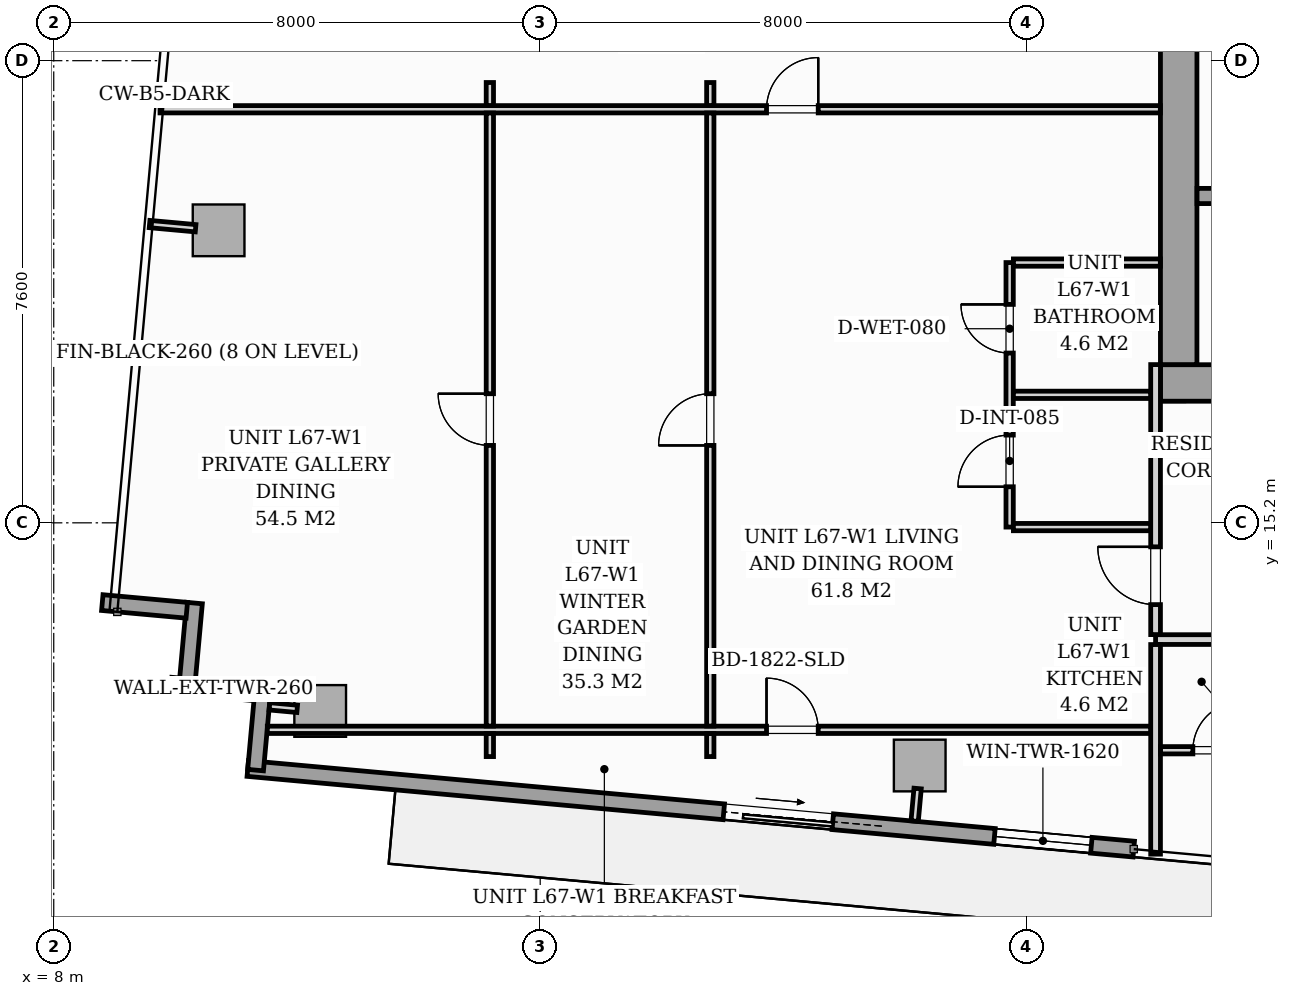
"""IFC4 building model, lengths in metres.
Left out: names, types, materials, properties, quantities, classifications, styles, units other than length and angle.
Written with IfcOpenShell. Run it as: python <this file> out.ifc"""

import sys

from ifc_helpers import new_model, si_unit, direction, frame, frame_2d, origin, origin_2d, place, context, subcontext, project, spatial, rectangle, i_section, extrude, source, transform, mapped, element, fill, save


model = new_model("IFC4")
c1 = context("Model", 3, precision=1e-05, world=origin(), true_north=direction((0.0, 1.0)))
c2 = subcontext(c1, "Body", "Model", "MODEL_VIEW")
j1 = project(units=[si_unit("LENGTHUNIT", "METRE"), si_unit("PLANEANGLEUNIT", "RADIAN")], contexts=[c1])
p1 = place(None, origin())
s1 = spatial("IfcSite", under=j1, at=p1, CompositionType="ELEMENT")
p2 = place(p1, origin())
s2 = spatial("IfcBuilding", under=s1, at=p2, CompositionType="ELEMENT")
p3 = place(p2, frame((0.0, 0.0, 233.1)))
s3 = spatial("IfcBuildingStorey", under=s2, at=p3, CompositionType="ELEMENT", Elevation=233.1)
m1 = source(origin(), c2, "Body", "SweptSolid", [
    extrude(i_section(OverallWidth=0.409, OverallDepth=0.425, WebThickness=0.033, FlangeThickness=0.052, FilletRadius=0.018, at=origin_2d()), origin(), (0.0, 0.0, 1.0), 3.296),
])
p4 = place(p3, frame((26.4, 17.4, 0.002), z_axis=(0.0, 0.0, 1.0), x_axis=(1.0, 0.0, 0.0)))
e1 = element("IfcColumn", 1, at=p4, inside=s3, PredefinedType="PILASTER", context=c2, shape_type="MappedRepresentation", body=[
    mapped(m1, transform((0.0, 0.0, 0.0), scale=1.0)),
])
m2 = source(origin(), c2, "Body", "SweptSolid", [
    extrude(rectangle(XDim=0.85, YDim=0.85, at=origin_2d()), origin(), (0.0, 0.0, 1.0), 3.296),
])
for number, where, z_axis, x_axis in (
    (2, (12.382, 12.106, 0.002), (0.0, 0.0, 1.0), (0.996, -0.091, 0.0)),
    (3, (22.241, 11.209, 0.002), (0.0, 0.0, 1.0), (0.996, -0.091, 0.0)),
    (4, (10.711, 20.01, 0.002), (0.0, 0.0, 1.0), (0.996, -0.091, 0.0)),
):
    element("IfcColumn", number, at=place(p3, frame(where, z_axis=z_axis, x_axis=x_axis)), inside=s3, PredefinedType="COLUMN", context=c2, shape_type="MappedRepresentation", body=[
        mapped(m2, transform((0.0, 0.0, 0.0), scale=1.0)),
    ])
p5 = place(p3, frame((11.319, 12.404, 0.0), z_axis=(0.0, 0.0, 1.0), x_axis=(-0.995881721538, 0.090661991521, 0.0)))
e5 = element("IfcWall", 5, at=p5, inside=s3, PredefinedType="STANDARD", context=c2, shape_type="SweptSolid", body=[
    extrude(rectangle(XDim=1.395, YDim=0.26, at=frame_2d((0.698, 0.0))), origin(), (0.0, 0.0, 1.0), 3.04),
])
p6 = place(p3, frame((10.188, 12.492, 0.0), z_axis=(0.0, 0.0, 1.0), x_axis=(0.090646191665, 0.995883159782, 0.0)))
e6 = element("IfcWall", 6, at=p6, inside=s3, PredefinedType="STANDARD", context=c2, shape_type="SweptSolid", body=[
    extrude(rectangle(XDim=1.395, YDim=0.26, at=frame_2d((0.698, 0.0))), origin(), (0.0, 0.0, 1.0), 3.04),
])
p7 = place(p3, frame((10.188, 13.762, 0.0), z_axis=(0.0, 0.0, 1.0), x_axis=(-0.995881721538, 0.090661991521, 0.0)))
e7 = element("IfcWall", 7, at=p7, inside=s3, PredefinedType="STANDARD", context=c2, shape_type="SweptSolid", body=[
    extrude(rectangle(XDim=1.395, YDim=0.26, at=frame_2d((0.698, 0.0))), origin(), (0.0, 0.0, 1.0), 3.04),
])
p8 = place(p3, frame((25.761, 9.834, 0.0), z_axis=(0.0, 0.0, 1.0), x_axis=(-0.995884584572, 0.090630536861, 0.0)))
e8 = element("IfcWall", 8, at=p8, inside=s3, PredefinedType="STANDARD", context=c2, shape_type="SweptSolid", body=[
    extrude(rectangle(XDim=14.63, YDim=0.26, at=frame_2d((7.315, 0.0))), origin(), (0.0, 0.0, 1.0), 3.04),
])
p9 = place(p8, frame((4.97, 0.0, 0.0)))
e9 = element("IfcOpeningElement", 9, at=p9, cuts=e8, PredefinedType="OPENING", context=c2, shape_type="SweptSolid", body=[
    extrude(rectangle(XDim=1.8, YDim=2.06, at=frame_2d((0.9, 1.03))), frame((0.0, 0.14, 0.0), z_axis=(0.0, -1.0, 0.0), x_axis=(1.0, 0.0, 0.0)), (0.0, 0.0, 1.0), 0.28),
])
p10 = place(p8, frame((0.7, 0.0, 0.65)))
e10 = element("IfcOpeningElement", 10, at=p10, cuts=e8, PredefinedType="OPENING", context=c2, shape_type="SweptSolid", body=[
    extrude(rectangle(XDim=1.6, YDim=1.5, at=frame_2d((0.8, 0.75))), frame((0.0, 0.14, 0.0), z_axis=(0.0, -1.0, 0.0), x_axis=(1.0, 0.0, 0.0)), (0.0, 0.0, 1.0), 0.28),
])
p11 = place(p3, frame((11.319, 11.134, 0.0), z_axis=(0.0, 0.0, 1.0), x_axis=(0.090661991521, 0.995881721538, 0.0)))
e11 = element("IfcWall", 11, at=p11, inside=s3, PredefinedType="STANDARD", context=c2, shape_type="SweptSolid", body=[
    extrude(rectangle(XDim=1.395, YDim=0.26, at=frame_2d((0.698, 0.0))), origin(), (0.0, 0.0, 1.0), 3.04),
])
p12 = place(p3, frame((26.2, 17.5, 0.0), z_axis=(0.0, 0.0, 1.0), x_axis=(1.0, 0.0, 0.0)))
e12 = element("IfcWall", 12, at=p12, inside=s3, PredefinedType="SHEAR", context=c2, shape_type="SweptSolid", body=[
    extrude(rectangle(XDim=19.6, YDim=0.6, at=frame_2d((9.8, 0.0))), origin(), (0.0, 0.0, 1.0), 3.3),
])
p13 = place(p12, frame((0.95, 0.0, 0.0)))
e13 = element("IfcOpeningElement", 13, at=p13, cuts=e12, PredefinedType="OPENING", context=c2, shape_type="SweptSolid", body=[
    extrude(rectangle(XDim=0.95, YDim=2.06, at=frame_2d((0.475, 1.03))), frame((0.0, 0.31, 0.0), z_axis=(0.0, -1.0, 0.0), x_axis=(1.0, 0.0, 0.0)), (0.0, 0.0, 1.0), 0.62),
])
p14 = place(p12, frame((9.38, 0.0, 0.0)))
e14 = element("IfcOpeningElement", 14, at=p14, cuts=e12, PredefinedType="OPENING", context=c2, shape_type="SweptSolid", body=[
    extrude(rectangle(XDim=0.85, YDim=2.0, at=frame_2d((0.425, 1.0))), frame((0.0, 0.31, 0.0), z_axis=(0.0, -1.0, 0.0), x_axis=(1.0, 0.0, 0.0)), (0.0, 0.0, 1.0), 0.62),
])
p15 = place(p12, frame((17.55, 0.0, 0.0)))
e15 = element("IfcOpeningElement", 15, at=p15, cuts=e12, PredefinedType="OPENING", context=c2, shape_type="SweptSolid", body=[
    extrude(rectangle(XDim=0.95, YDim=2.06, at=frame_2d((0.475, 1.03))), frame((0.0, 0.31, 0.0), z_axis=(0.0, -1.0, 0.0), x_axis=(1.0, 0.0, 0.0)), (0.0, 0.0, 1.0), 0.62),
])
p16 = place(p3, frame((26.5, 17.802, 0.0), z_axis=(0.0, 0.0, 1.0), x_axis=(0.0, 1.0, 0.0)))
e16 = element("IfcWall", 16, at=p16, inside=s3, PredefinedType="SHEAR", context=c2, shape_type="SweptSolid", body=[
    extrude(rectangle(XDim=5.796, YDim=0.6, at=frame_2d((2.898, 0.0))), origin(), (0.0, 0.0, 1.0), 3.3),
])
p17 = place(p3, frame((26.802, 20.575, 0.0), z_axis=(0.0, 0.0, 1.0), x_axis=(1.0, 0.0, 0.0)))
e17 = element("IfcWall", 17, at=p17, inside=s3, PredefinedType="SOLIDWALL", context=c2, shape_type="SweptSolid", body=[
    extrude(rectangle(XDim=8.148, YDim=0.25, at=frame_2d((4.074, 0.0))), origin(), (0.0, 0.0, 1.0), 3.3),
])
p18 = place(p17, frame((0.298, 0.0, 0.0)))
e18 = element("IfcOpeningElement", 18, at=p18, cuts=e17, PredefinedType="OPENING", context=c2, shape_type="SweptSolid", body=[
    extrude(rectangle(XDim=0.95, YDim=2.06, at=frame_2d((0.475, 1.03))), frame((0.0, 0.135, 0.0), z_axis=(0.0, -1.0, 0.0), x_axis=(1.0, 0.0, 0.0)), (0.0, 0.0, 1.0), 0.27),
])
p19 = place(p3, frame((26.12, 13.28, 0.0), z_axis=(0.0, 0.0, 1.0), x_axis=(1.0, 0.0, 0.0)))
e19 = element("IfcWall", 19, at=p19, inside=s3, PredefinedType="PARTITIONING", context=c2, shape_type="SweptSolid", body=[
    extrude(rectangle(XDim=21.33, YDim=0.16, at=frame_2d((10.665, 0.0))), origin(), (0.0, 0.0, 1.0), 2.556),
])
p20 = place(p19, frame((4.704, 0.0, 0.0)))
e20 = element("IfcOpeningElement", 20, at=p20, cuts=e19, PredefinedType="OPENING", context=c2, shape_type="SweptSolid", body=[
    extrude(rectangle(XDim=0.95, YDim=2.06, at=frame_2d((0.475, 1.03))), frame((0.0, 0.09, 0.0), z_axis=(0.0, -1.0, 0.0), x_axis=(1.0, 0.0, 0.0)), (0.0, 0.0, 1.0), 0.18),
])
p21 = place(p19, frame((7.5, 0.0, 0.0)))
e21 = element("IfcOpeningElement", 21, at=p21, cuts=e19, PredefinedType="OPENING", context=c2, shape_type="SweptSolid", body=[
    extrude(rectangle(XDim=0.95, YDim=2.06, at=frame_2d((0.475, 1.03))), frame((0.0, 0.09, 0.0), z_axis=(0.0, -1.0, 0.0), x_axis=(1.0, 0.0, 0.0)), (0.0, 0.0, 1.0), 0.18),
])
p22 = place(p19, frame((14.976, 0.0, 0.0)))
e22 = element("IfcOpeningElement", 22, at=p22, cuts=e19, PredefinedType="OPENING", context=c2, shape_type="SweptSolid", body=[
    extrude(rectangle(XDim=0.95, YDim=2.06, at=frame_2d((0.475, 1.03))), frame((0.0, 0.09, 0.0), z_axis=(0.0, -1.0, 0.0), x_axis=(1.0, 0.0, 0.0)), (0.0, 0.0, 1.0), 0.18),
])
p23 = place(p3, frame((26.12, 9.751, 0.0), z_axis=(0.0, 0.0, 1.0), x_axis=(0.0, 1.0, 0.0)))
e23 = element("IfcWall", 23, at=p23, inside=s3, PredefinedType="PARTITIONING", context=c2, shape_type="SweptSolid", body=[
    extrude(rectangle(XDim=3.447, YDim=0.16, at=frame_2d((1.723, 0.0))), origin(), (0.0, 0.0, 1.0), 3.04),
])
p24 = place(p3, frame((26.12, 13.362, 0.0), z_axis=(0.0, 0.0, 1.0), x_axis=(0.0, 1.0, 0.0)))
e24 = element("IfcWall", 24, at=p24, inside=s3, PredefinedType="PARTITIONING", context=c2, shape_type="SweptSolid", body=[
    extrude(rectangle(XDim=4.44, YDim=0.16, at=frame_2d((2.22, 0.0))), origin(), (0.0, 0.0, 1.0), 3.04),
])
p25 = place(p24, frame((0.493, 0.0, 0.0)))
e25 = element("IfcOpeningElement", 25, at=p25, cuts=e24, PredefinedType="OPENING", context=c2, shape_type="SweptSolid", body=[
    extrude(rectangle(XDim=0.95, YDim=2.06, at=frame_2d((0.475, 1.03))), frame((0.0, 0.09, 0.0), z_axis=(0.0, -1.0, 0.0), x_axis=(1.0, 0.0, 0.0)), (0.0, 0.0, 1.0), 0.18),
])
p26 = place(p3, frame((26.202, 11.46, 0.0), z_axis=(0.0, 0.0, 1.0), x_axis=(1.0, 0.0, 0.0)))
e26 = element("IfcWall", 26, at=p26, inside=s3, PredefinedType="PARTITIONING", context=c2, shape_type="SweptSolid", body=[
    extrude(rectangle(XDim=3.978, YDim=0.12, at=frame_2d((1.989, 0.0))), origin(), (0.0, 0.0, 1.0), 2.556),
])
p27 = place(p26, frame((0.531, 0.0, 0.0)))
e27 = element("IfcOpeningElement", 27, at=p27, cuts=e26, PredefinedType="OPENING", context=c2, shape_type="SweptSolid", body=[
    extrude(rectangle(XDim=0.8, YDim=2.02, at=frame_2d((0.4, 1.01))), frame((0.0, 0.07, 0.0), z_axis=(0.0, -1.0, 0.0), x_axis=(1.0, 0.0, 0.0)), (0.0, 0.0, 1.0), 0.14),
])
p28 = place(p26, frame((2.496, 0.0, 0.0)))
e28 = element("IfcOpeningElement", 28, at=p28, cuts=e26, PredefinedType="OPENING", context=c2, shape_type="SweptSolid", body=[
    extrude(rectangle(XDim=0.85, YDim=2.05, at=frame_2d((0.425, 1.025))), frame((0.0, 0.07, 0.0), z_axis=(0.0, -1.0, 0.0), x_axis=(1.0, 0.0, 0.0)), (0.0, 0.0, 1.0), 0.14),
])
p29 = place(p3, frame((23.72, 15.13, 0.0), z_axis=(0.0, 0.0, 1.0), x_axis=(0.0, 1.0, 0.0)))
e29 = element("IfcWall", 29, at=p29, inside=s3, PredefinedType="PARTITIONING", context=c2, shape_type="SweptSolid", body=[
    extrude(rectangle(XDim=4.35, YDim=0.12, at=frame_2d((2.175, 0.0))), origin(), (0.0, 0.0, 1.0), 3.04),
])
p30 = place(p29, frame((0.663, 0.0, 0.0)))
e30 = element("IfcOpeningElement", 30, at=p30, cuts=e29, PredefinedType="OPENING", context=c2, shape_type="SweptSolid", body=[
    extrude(rectangle(XDim=0.85, YDim=2.05, at=frame_2d((0.425, 1.025))), frame((0.0, 0.07, 0.0), z_axis=(0.0, -1.0, 0.0), x_axis=(1.0, 0.0, 0.0)), (0.0, 0.0, 1.0), 0.14),
])
p31 = place(p29, frame((2.862, 0.0, 0.0)))
e31 = element("IfcOpeningElement", 31, at=p31, cuts=e29, PredefinedType="OPENING", context=c2, shape_type="SweptSolid", body=[
    extrude(rectangle(XDim=0.8, YDim=2.02, at=frame_2d((0.4, 1.01))), frame((0.0, 0.07, 0.0), z_axis=(0.0, -1.0, 0.0), x_axis=(1.0, 0.0, 0.0)), (0.0, 0.0, 1.0), 0.14),
])
p32 = place(p3, frame((23.782, 17.305, 0.0), z_axis=(0.0, 0.0, 1.0), x_axis=(1.0, 0.0, 0.0)))
e32 = element("IfcWall", 32, at=p32, inside=s3, PredefinedType="PARTITIONING", context=c2, shape_type="SweptSolid", body=[
    extrude(rectangle(XDim=2.256, YDim=0.12, at=frame_2d((1.128, 0.0))), origin(), (0.0, 0.0, 1.0), 2.381),
])
p33 = place(p3, frame((23.782, 15.13, 0.0), z_axis=(0.0, 0.0, 1.0), x_axis=(1.0, 0.0, 0.0)))
e33 = element("IfcWall", 33, at=p33, inside=s3, PredefinedType="PARTITIONING", context=c2, shape_type="SweptSolid", body=[
    extrude(rectangle(XDim=2.256, YDim=0.12, at=frame_2d((1.128, 0.0))), origin(), (0.0, 0.0, 1.0), 3.04),
])
p34 = place(p3, frame((23.782, 19.48, 0.0), z_axis=(0.0, 0.0, 1.0), x_axis=(1.0, 0.0, 0.0)))
e34 = element("IfcWall", 34, at=p34, inside=s3, PredefinedType="PARTITIONING", context=c2, shape_type="SweptSolid", body=[
    extrude(rectangle(XDim=2.416, YDim=0.12, at=frame_2d((1.208, 0.0))), origin(), (0.0, 0.0, 1.0), 3.04),
])
p35 = place(p3, frame((9.748, 22.001, 0.0), z_axis=(0.0, 0.0, 1.0), x_axis=(1.0, 0.0, 0.0)))
e35 = element("IfcWall", 35, at=p35, inside=s3, PredefinedType="PARTITIONING", context=c2, shape_type="SweptSolid", body=[
    extrude(rectangle(XDim=16.45, YDim=0.12, at=frame_2d((8.225, 0.0))), origin(), (0.0, 0.0, 1.0), 3.04),
])
p36 = place(p35, frame((9.974, 0.0, 0.0)))
e36 = element("IfcOpeningElement", 36, at=p36, cuts=e35, PredefinedType="OPENING", context=c2, shape_type="SweptSolid", body=[
    extrude(rectangle(XDim=0.85, YDim=2.05, at=frame_2d((0.425, 1.025))), frame((0.0, 0.07, 0.0), z_axis=(0.0, -1.0, 0.0), x_axis=(1.0, 0.0, 0.0)), (0.0, 0.0, 1.0), 0.14),
])
p37 = place(p3, frame((11.512, 11.796, 0.0), z_axis=(0.0, 0.0, 1.0), x_axis=(1.0, 0.0, 0.0)))
e37 = element("IfcWall", 37, at=p37, inside=s3, PredefinedType="PARTITIONING", context=c2, shape_type="SweptSolid", body=[
    extrude(rectangle(XDim=14.526, YDim=0.12, at=frame_2d((7.263, 0.0))), origin(), (0.0, 0.0, 1.0), 2.482),
])
p38 = place(p37, frame((8.21, 0.0, 0.0)))
e38 = element("IfcOpeningElement", 38, at=p38, cuts=e37, PredefinedType="OPENING", context=c2, shape_type="SweptSolid", body=[
    extrude(rectangle(XDim=0.85, YDim=2.05, at=frame_2d((0.425, 1.025))), frame((0.0, 0.07, 0.0), z_axis=(0.0, -1.0, 0.0), x_axis=(1.0, 0.0, 0.0)), (0.0, 0.0, 1.0), 0.14),
])
p39 = place(p3, frame((15.172, 11.356, 0.0), z_axis=(0.0, 0.0, 1.0), x_axis=(0.0, 1.0, 0.0)))
e39 = element("IfcWall", 39, at=p39, inside=s3, PredefinedType="PARTITIONING", context=c2, shape_type="SweptSolid", body=[
    extrude(rectangle(XDim=0.378, YDim=0.12, at=frame_2d((0.189, 0.0))), origin(), (0.0, 0.0, 1.0), 3.04),
])
p40 = place(p3, frame((15.172, 11.858, 0.0), z_axis=(0.0, 0.0, 1.0), x_axis=(0.0, 1.0, 0.0)))
e40 = element("IfcWall", 40, at=p40, inside=s3, PredefinedType="PARTITIONING", context=c2, shape_type="SweptSolid", body=[
    extrude(rectangle(XDim=10.081, YDim=0.12, at=frame_2d((5.041, 0.0))), origin(), (0.0, 0.0, 1.0), 3.04),
])
p41 = place(p40, frame((4.615, 0.0, 0.0)))
e41 = element("IfcOpeningElement", 41, at=p41, cuts=e40, PredefinedType="OPENING", context=c2, shape_type="SweptSolid", body=[
    extrude(rectangle(XDim=0.85, YDim=2.05, at=frame_2d((0.425, 1.025))), frame((0.0, 0.07, 0.0), z_axis=(0.0, -1.0, 0.0), x_axis=(1.0, 0.0, 0.0)), (0.0, 0.0, 1.0), 0.14),
])
for number, where, z_axis, x_axis in (
    (42, (15.172, 22.063, 0.0), (0.0, 0.0, 1.0), (0.0, 1.0, 0.0)),
    (43, (18.797, 11.356, 0.0), (0.0, 0.0, 1.0), (0.0, 1.0, 0.0)),
):
    element("IfcWall", number, at=place(p3, frame(where, z_axis=z_axis, x_axis=x_axis)), inside=s3, PredefinedType="PARTITIONING", context=c2, shape_type="SweptSolid", body=[
        extrude(rectangle(XDim=0.378, YDim=0.12, at=frame_2d((0.189, 0.0))), origin(), (0.0, 0.0, 1.0), 3.04),
    ])
p42 = place(p3, frame((18.797, 11.858, 0.0), z_axis=(0.0, 0.0, 1.0), x_axis=(0.0, 1.0, 0.0)))
e44 = element("IfcWall", 44, at=p42, inside=s3, PredefinedType="PARTITIONING", context=c2, shape_type="SweptSolid", body=[
    extrude(rectangle(XDim=10.081, YDim=0.12, at=frame_2d((5.041, 0.0))), origin(), (0.0, 0.0, 1.0), 3.04),
])
p43 = place(p42, frame((4.615, 0.0, 0.0)))
e45 = element("IfcOpeningElement", 45, at=p43, cuts=e44, PredefinedType="OPENING", context=c2, shape_type="SweptSolid", body=[
    extrude(rectangle(XDim=0.85, YDim=2.05, at=frame_2d((0.425, 1.025))), frame((0.0, 0.07, 0.0), z_axis=(0.0, -1.0, 0.0), x_axis=(1.0, 0.0, 0.0)), (0.0, 0.0, 1.0), 0.14),
])
p44 = place(p3, frame((18.797, 22.063, 0.0), z_axis=(0.0, 0.0, 1.0), x_axis=(0.0, 1.0, 0.0)))
e46 = element("IfcWall", 46, at=p44, inside=s3, PredefinedType="PARTITIONING", context=c2, shape_type="SweptSolid", body=[
    extrude(rectangle(XDim=0.378, YDim=0.12, at=frame_2d((0.189, 0.0))), origin(), (0.0, 0.0, 1.0), 3.04),
])
p45 = place(p3, frame((12.003, 12.141, 0.0), z_axis=(0.0, 0.0, 1.0), x_axis=(-0.995884462012, 0.090631883588, 0.0)))
e47 = element("IfcWall", 47, at=p45, inside=s3, PredefinedType="PARTITIONING", context=c2, shape_type="SweptSolid", body=[
    extrude(rectangle(XDim=0.458, YDim=0.12, at=frame_2d((0.229, 0.0))), origin(), (0.0, 0.0, 1.0), 3.04),
])
p46 = place(p3, frame((22.207, 10.831, 0.0), z_axis=(0.0, 0.0, 1.0), x_axis=(-0.090781299264, -0.995870852924, 0.0)))
e48 = element("IfcWall", 48, at=p46, inside=s3, PredefinedType="PARTITIONING", context=c2, shape_type="SweptSolid", body=[
    extrude(rectangle(XDim=0.538, YDim=0.12, at=frame_2d((0.269, 0.0))), origin(), (0.0, 0.0, 1.0), 3.04),
])
p47 = place(p3, frame((10.333, 20.045, 0.0), z_axis=(0.0, 0.0, 1.0), x_axis=(-0.995890573658, 0.09056470228, 0.0)))
e49 = element("IfcWall", 49, at=p47, inside=s3, PredefinedType="PARTITIONING", context=c2, shape_type="SweptSolid", body=[
    extrude(rectangle(XDim=0.76, YDim=0.12, at=frame_2d((0.38, 0.0))), origin(), (0.0, 0.0, 1.0), 3.04),
])
m3 = source(origin(), c2, "Body", "SweptSolid", [
    extrude(rectangle(XDim=1.8, YDim=2.06, at=frame_2d((0.9, 1.03))), frame((0.0, 0.025, 0.0), z_axis=(0.0, -1.0, 0.0), x_axis=(1.0, 0.0, 0.0)), (0.0, 0.0, 1.0), 0.05),
])
p48 = place(p9, origin())
e50 = element("IfcDoor", 50, at=p48, inside=s3, OperationType="SLIDING_TO_LEFT", PredefinedType="DOOR", context=c2, shape_type="MappedRepresentation", body=[
    mapped(m3, transform((0.0, 0.0, 0.0), scale=1.0)),
])
fill(e9, e50)
m4 = source(origin(), c2, "Body", "SweptSolid", [
    extrude(rectangle(XDim=1.6, YDim=1.5, at=frame_2d((0.8, 0.75))), frame((0.0, 0.03, 0.0), z_axis=(0.0, -1.0, 0.0), x_axis=(1.0, 0.0, 0.0)), (0.0, 0.0, 1.0), 0.06),
])
p49 = place(p10, origin())
e51 = element("IfcWindow", 51, at=p49, inside=s3, PartitioningType="SINGLE_PANEL", PredefinedType="WINDOW", context=c2, shape_type="MappedRepresentation", body=[
    mapped(m4, transform((0.0, 0.0, 0.0), scale=1.0)),
])
fill(e10, e51)
m5 = source(origin(), c2, "Body", "SweptSolid", [
    extrude(rectangle(XDim=0.8, YDim=2.02, at=frame_2d((0.4, 1.01))), frame((0.0, 0.025, 0.0), z_axis=(0.0, -1.0, 0.0), x_axis=(1.0, 0.0, 0.0)), (0.0, 0.0, 1.0), 0.05),
])
p50 = place(p27, origin())
e52 = element("IfcDoor", 52, at=p50, inside=s3, OperationType="SINGLE_SWING_RIGHT", PredefinedType="DOOR", context=c2, shape_type="MappedRepresentation", body=[
    mapped(m5, transform((0.0, 0.0, 0.0), scale=1.0)),
])
fill(e27, e52)
m6 = source(origin(), c2, "Body", "SweptSolid", [
    extrude(rectangle(XDim=0.95, YDim=2.06, at=frame_2d((0.475, 1.03))), frame((0.0, 0.025, 0.0), z_axis=(0.0, -1.0, 0.0), x_axis=(1.0, 0.0, 0.0)), (0.0, 0.0, 1.0), 0.05),
])
p51 = place(p25, origin())
e53 = element("IfcDoor", 53, at=p51, inside=s3, OperationType="SINGLE_SWING_RIGHT", PredefinedType="DOOR", context=c2, shape_type="MappedRepresentation", body=[
    mapped(m6, transform((0.0, 0.0, 0.0), scale=1.0)),
])
fill(e25, e53)
m7 = source(origin(), c2, "Body", "SweptSolid", [
    extrude(rectangle(XDim=0.85, YDim=2.05, at=frame_2d((0.425, 1.025))), frame((0.0, 0.025, 0.0), z_axis=(0.0, -1.0, 0.0), x_axis=(1.0, 0.0, 0.0)), (0.0, 0.0, 1.0), 0.05),
])
p52 = place(p30, origin())
e54 = element("IfcDoor", 54, at=p52, inside=s3, OperationType="SINGLE_SWING_LEFT", PredefinedType="DOOR", context=c2, shape_type="MappedRepresentation", body=[
    mapped(m7, transform((0.0, 0.0, 0.0), scale=1.0)),
])
fill(e30, e54)
p53 = place(p31, origin())
e55 = element("IfcDoor", 55, at=p53, inside=s3, OperationType="SINGLE_SWING_RIGHT", PredefinedType="DOOR", context=c2, shape_type="MappedRepresentation", body=[
    mapped(m5, transform((0.0, 0.0, 0.0), scale=1.0)),
])
fill(e31, e55)
p54 = place(p36, origin())
e56 = element("IfcDoor", 56, at=p54, inside=s3, OperationType="SINGLE_SWING_RIGHT", PredefinedType="DOOR", context=c2, shape_type="MappedRepresentation", body=[
    mapped(m7, transform((0.0, 0.0, 0.0), scale=1.0)),
])
fill(e36, e56)
p55 = place(p38, origin())
e57 = element("IfcDoor", 57, at=p55, inside=s3, OperationType="SINGLE_SWING_LEFT", PredefinedType="DOOR", context=c2, shape_type="MappedRepresentation", body=[
    mapped(m7, transform((0.0, 0.0, 0.0), scale=1.0)),
])
fill(e38, e57)
p56 = place(p41, origin())
e58 = element("IfcDoor", 58, at=p56, inside=s3, OperationType="SINGLE_SWING_RIGHT", PredefinedType="DOOR", context=c2, shape_type="MappedRepresentation", body=[
    mapped(m7, transform((0.0, 0.0, 0.0), scale=1.0)),
])
fill(e41, e58)
p57 = place(p43, origin())
e59 = element("IfcDoor", 59, at=p57, inside=s3, OperationType="SINGLE_SWING_LEFT", PredefinedType="DOOR", context=c2, shape_type="MappedRepresentation", body=[
    mapped(m7, transform((0.0, 0.0, 0.0), scale=1.0)),
])
fill(e45, e59)
save(model, sys.argv[1])
